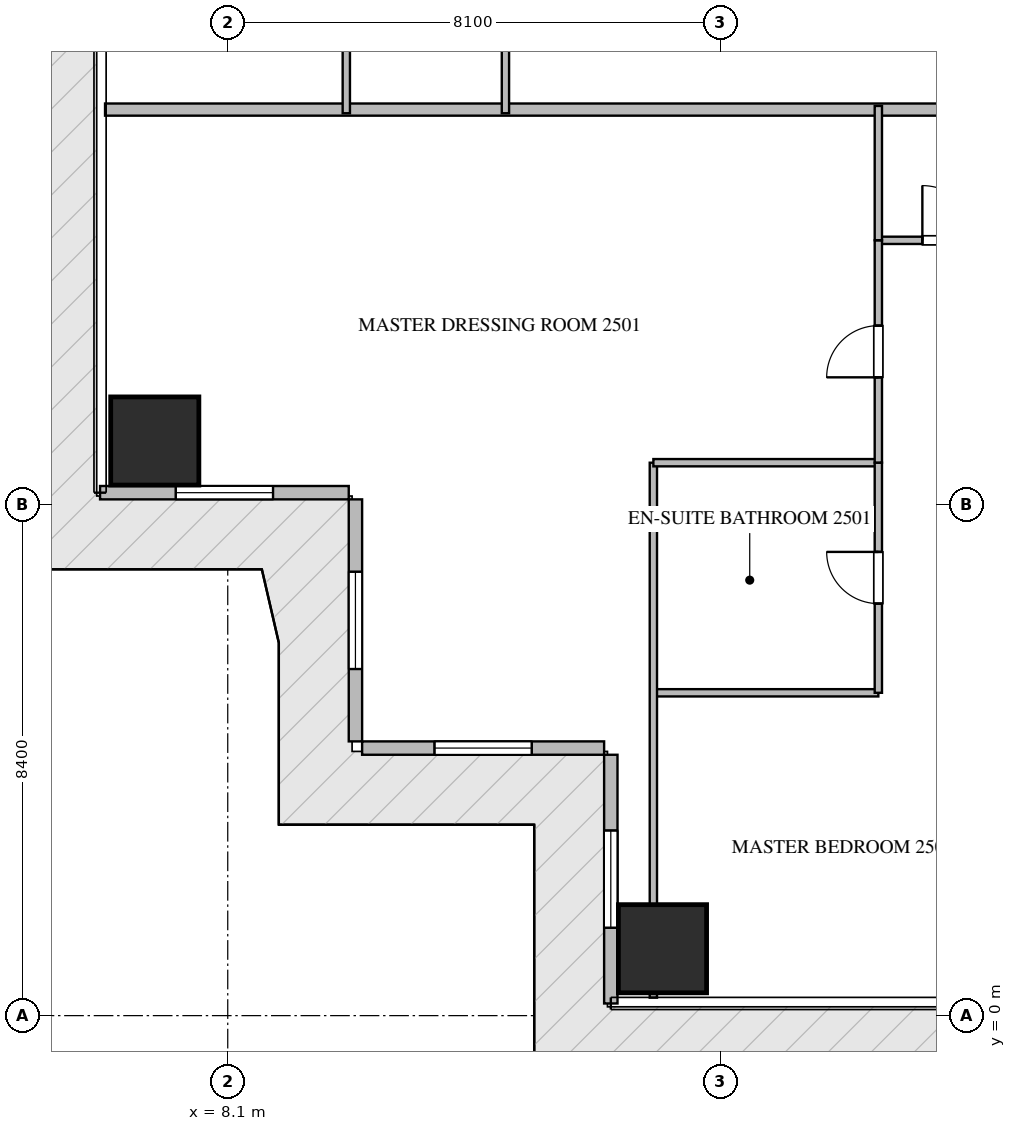
"""IFC4 building model, lengths in metres.
Left out: names, types, materials, properties, quantities, classifications, styles, units other than length and angle.
Written with IfcOpenShell. Run it as: python <this file> out.ifc"""

import sys

from ifc_helpers import new_model, si_unit, direction, frame, frame_2d, origin, origin_2d, place, context, subcontext, project, spatial, rectangle, extrude, source, transform, mapped, element, fill, save


model = new_model("IFC4")
c1 = context("Model", 3, precision=1e-05, world=origin(), true_north=direction((0.0, 1.0)))
c2 = subcontext(c1, "Body", "Model", "MODEL_VIEW")
j1 = project(units=[si_unit("LENGTHUNIT", "METRE"), si_unit("PLANEANGLEUNIT", "RADIAN")], contexts=[c1])
p1 = place(None, origin())
s1 = spatial("IfcSite", under=j1, at=p1, CompositionType="ELEMENT")
p2 = place(p1, origin())
s2 = spatial("IfcBuilding", under=s1, at=p2, CompositionType="ELEMENT")
p3 = place(p2, frame((0.0, 0.0, 101.7)))
s3 = spatial("IfcBuildingStorey", under=s2, at=p3, CompositionType="ELEMENT", Elevation=101.7)
m1 = source(origin(), c2, "Body", "SweptSolid", [
    extrude(rectangle(XDim=1.45, YDim=1.45, at=origin_2d()), origin(), (0.0, 0.0, 1.0), 3.75),
])
for number, where, z_axis, x_axis in (
    (1, (15.25, 1.1, -0.26), (0.0, 0.0, 1.0), (1.0, 0.0, 0.0)),
    (2, (6.9, 9.45, -0.26), (0.0, 0.0, 1.0), (1.0, 0.0, 0.0)),
):
    element("IfcColumn", number, at=place(p3, frame(where, z_axis=z_axis, x_axis=x_axis)), inside=s3, PredefinedType="COLUMN", context=c2, shape_type="MappedRepresentation", body=[
        mapped(m1, transform((0.0, 0.0, 0.0), scale=1.0)),
    ])
p4 = place(p3, frame((6.0, 8.6, 0.0), z_axis=(0.0, 0.0, 1.0), x_axis=(1.0, 0.0, 0.0)))
e3 = element("IfcWall", 3, at=p4, inside=s3, PredefinedType="ELEMENTEDWALL", context=c2, shape_type="SweptSolid", body=[
    extrude(rectangle(XDim=4.09, YDim=0.22, at=frame_2d((2.045, 0.0))), origin(), (0.0, 0.0, 1.0), 3.475),
])
p5 = place(p4, frame((1.245, 0.0, 0.65)))
e4 = element("IfcOpeningElement", 4, at=p5, cuts=e3, PredefinedType="OPENING", context=c2, shape_type="SweptSolid", body=[
    extrude(rectangle(XDim=1.6, YDim=2.1, at=frame_2d((0.8, 1.05))), frame((0.0, 0.12, 0.0), z_axis=(0.0, -1.0, 0.0), x_axis=(1.0, 0.0, 0.0)), (0.0, 0.0, 1.0), 0.24),
])
p6 = place(p3, frame((10.2, 8.49, 0.0), z_axis=(0.0, 0.0, 1.0), x_axis=(0.0, -1.0, 0.0)))
e5 = element("IfcWall", 5, at=p6, inside=s3, PredefinedType="ELEMENTEDWALL", context=c2, shape_type="SweptSolid", body=[
    extrude(rectangle(XDim=3.98, YDim=0.22, at=frame_2d((1.99, 0.0))), origin(), (0.0, 0.0, 1.0), 3.475),
])
p7 = place(p6, frame((1.19, 0.0, 0.65)))
e6 = element("IfcOpeningElement", 6, at=p7, cuts=e5, PredefinedType="OPENING", context=c2, shape_type="SweptSolid", body=[
    extrude(rectangle(XDim=1.6, YDim=2.1, at=frame_2d((0.8, 1.05))), frame((0.0, 0.12, 0.0), z_axis=(0.0, -1.0, 0.0), x_axis=(1.0, 0.0, 0.0)), (0.0, 0.0, 1.0), 0.24),
])
p8 = place(p3, frame((10.31, 4.4, 0.0), z_axis=(0.0, 0.0, 1.0), x_axis=(1.0, 0.0, 0.0)))
e7 = element("IfcWall", 7, at=p8, inside=s3, PredefinedType="ELEMENTEDWALL", context=c2, shape_type="SweptSolid", body=[
    extrude(rectangle(XDim=3.98, YDim=0.22, at=frame_2d((1.99, 0.0))), origin(), (0.0, 0.0, 1.0), 3.475),
])
p9 = place(p8, frame((1.19, 0.0, 0.65)))
e8 = element("IfcOpeningElement", 8, at=p9, cuts=e7, PredefinedType="OPENING", context=c2, shape_type="SweptSolid", body=[
    extrude(rectangle(XDim=1.6, YDim=2.1, at=frame_2d((0.8, 1.05))), frame((0.0, 0.12, 0.0), z_axis=(0.0, -1.0, 0.0), x_axis=(1.0, 0.0, 0.0)), (0.0, 0.0, 1.0), 0.24),
])
p10 = place(p3, frame((14.4, 4.29, 0.0), z_axis=(0.0, 0.0, 1.0), x_axis=(0.0, -1.0, 0.0)))
e9 = element("IfcWall", 9, at=p10, inside=s3, PredefinedType="ELEMENTEDWALL", context=c2, shape_type="SweptSolid", body=[
    extrude(rectangle(XDim=4.09, YDim=0.22, at=frame_2d((2.045, 0.0))), origin(), (0.0, 0.0, 1.0), 3.475),
])
p11 = place(p10, frame((1.245, 0.0, 0.65)))
e10 = element("IfcOpeningElement", 10, at=p11, cuts=e9, PredefinedType="OPENING", context=c2, shape_type="SweptSolid", body=[
    extrude(rectangle(XDim=1.6, YDim=2.1, at=frame_2d((0.8, 1.05))), frame((0.0, 0.12, 0.0), z_axis=(0.0, -1.0, 0.0), x_axis=(1.0, 0.0, 0.0)), (0.0, 0.0, 1.0), 0.24),
])
p12 = place(p3, frame((6.082, 14.9, 0.0), z_axis=(0.0, 0.0, 1.0), x_axis=(1.0, 0.0, 0.0)))
e11 = element("IfcWall", 11, at=p12, inside=s3, PredefinedType="PARTITIONING", context=c2, shape_type="SweptSolid", body=[
    extrude(rectangle(XDim=15.318, YDim=0.2, at=frame_2d((7.659, 0.0))), origin(), (0.0, 0.0, 1.0), 3.49),
])
p13 = place(p3, frame((18.8, 12.75, 0.0), z_axis=(0.0, 0.0, 1.0), x_axis=(1.0, 0.0, 0.0)))
e12 = element("IfcWall", 12, at=p13, inside=s3, PredefinedType="PARTITIONING", context=c2, shape_type="SweptSolid", body=[
    extrude(rectangle(XDim=2.348, YDim=0.12, at=frame_2d((1.174, 0.0))), origin(), (0.0, 0.0, 1.0), 3.49),
])
p14 = place(p13, frame((0.724, 0.0, 0.0)))
e13 = element("IfcOpeningElement", 13, at=p14, cuts=e12, PredefinedType="OPENING", context=c2, shape_type="SweptSolid", body=[
    extrude(rectangle(XDim=0.9, YDim=2.1, at=frame_2d((0.45, 1.05))), frame((0.0, 0.07, 0.0), z_axis=(0.0, -1.0, 0.0), x_axis=(1.0, 0.0, 0.0)), (0.0, 0.0, 1.0), 0.14),
])
p15 = place(p3, frame((15.1, 5.309, 0.0), z_axis=(0.0, 0.0, 1.0), x_axis=(1.0, 0.0, 0.0)))
e14 = element("IfcWall", 14, at=p15, inside=s3, PredefinedType="PARTITIONING", context=c2, shape_type="SweptSolid", body=[
    extrude(rectangle(XDim=3.7, YDim=0.12, at=frame_2d((1.85, 0.0))), origin(), (0.0, 0.0, 1.0), 3.49),
])
p16 = place(p3, frame((15.1, 0.295, 0.0), z_axis=(0.0, 0.0, 1.0), x_axis=(0.0, 1.0, 0.0)))
e15 = element("IfcWall", 15, at=p16, inside=s3, PredefinedType="PARTITIONING", context=c2, shape_type="SweptSolid", body=[
    extrude(rectangle(XDim=8.798, YDim=0.12, at=frame_2d((4.399, 0.0))), origin(), (0.0, 0.0, 1.0), 2.922),
])
p17 = place(p3, frame((15.1, 9.093, 0.0), z_axis=(0.0, 0.0, 1.0), x_axis=(1.0, 0.0, 0.0)))
e16 = element("IfcWall", 16, at=p17, inside=s3, PredefinedType="PARTITIONING", context=c2, shape_type="SweptSolid", body=[
    extrude(rectangle(XDim=3.7, YDim=0.12, at=frame_2d((1.85, 0.0))), origin(), (0.0, 0.0, 1.0), 3.49),
])
p18 = place(p3, frame((18.8, 5.309, 0.0), z_axis=(0.0, 0.0, 1.0), x_axis=(0.0, 1.0, 0.0)))
e17 = element("IfcWall", 17, at=p18, inside=s3, PredefinedType="PARTITIONING", context=c2, shape_type="SweptSolid", body=[
    extrude(rectangle(XDim=3.784, YDim=0.12, at=frame_2d((1.892, 0.0))), origin(), (0.0, 0.0, 1.0), 3.49),
])
p19 = place(p18, frame((1.467, 0.0, 0.0)))
e18 = element("IfcOpeningElement", 18, at=p19, cuts=e17, PredefinedType="OPENING", context=c2, shape_type="SweptSolid", body=[
    extrude(rectangle(XDim=0.85, YDim=2.1, at=frame_2d((0.425, 1.05))), frame((0.0, 0.07, 0.0), z_axis=(0.0, -1.0, 0.0), x_axis=(1.0, 0.0, 0.0)), (0.0, 0.0, 1.0), 0.14),
])
p20 = place(p3, frame((18.8, 9.095, 0.0), z_axis=(0.0, 0.0, 1.0), x_axis=(0.0, 1.0, 0.0)))
e19 = element("IfcWall", 19, at=p20, inside=s3, PredefinedType="PARTITIONING", context=c2, shape_type="SweptSolid", body=[
    extrude(rectangle(XDim=3.655, YDim=0.12, at=frame_2d((1.828, 0.0))), origin(), (0.0, 0.0, 1.0), 3.49),
])
p21 = place(p20, frame((1.402, 0.0, 0.0)))
e20 = element("IfcOpeningElement", 20, at=p21, cuts=e19, PredefinedType="OPENING", context=c2, shape_type="SweptSolid", body=[
    extrude(rectangle(XDim=0.85, YDim=2.1, at=frame_2d((0.425, 1.05))), frame((0.0, 0.07, 0.0), z_axis=(0.0, -1.0, 0.0), x_axis=(1.0, 0.0, 0.0)), (0.0, 0.0, 1.0), 0.14),
])
p22 = place(p3, frame((18.8, 12.752, 0.0), z_axis=(0.0, 0.0, 1.0), x_axis=(0.0, 1.0, 0.0)))
e21 = element("IfcWall", 21, at=p22, inside=s3, PredefinedType="PARTITIONING", context=c2, shape_type="SweptSolid", body=[
    extrude(rectangle(XDim=2.208, YDim=0.12, at=frame_2d((1.104, 0.0))), origin(), (0.0, 0.0, 1.0), 3.49),
])
for number, where, z_axis, x_axis in (
    (22, (10.05, 14.84, 0.0), (0.0, 0.0, 1.0), (0.0, 1.0, 0.0)),
    (23, (12.667, 14.84, 0.0), (0.0, 0.0, 1.0), (0.0, 1.0, 0.0)),
):
    element("IfcWall", number, at=place(p3, frame(where, z_axis=z_axis, x_axis=x_axis)), inside=s3, PredefinedType="PARTITIONING", context=c2, shape_type="SweptSolid", body=[
        extrude(rectangle(XDim=5.41, YDim=0.12, at=frame_2d((2.705, 0.0))), origin(), (0.0, 0.0, 1.0), 3.49),
    ])
m2 = source(origin(), c2, "Body", "SweptSolid", [
    extrude(rectangle(XDim=1.6, YDim=2.1, at=frame_2d((0.8, 1.05))), frame((0.0, 0.03, 0.0), z_axis=(0.0, -1.0, 0.0), x_axis=(1.0, 0.0, 0.0)), (0.0, 0.0, 1.0), 0.06),
])
p23 = place(p5, origin())
e24 = element("IfcWindow", 24, at=p23, inside=s3, PartitioningType="SINGLE_PANEL", PredefinedType="WINDOW", context=c2, shape_type="MappedRepresentation", body=[
    mapped(m2, transform((0.0, 0.0, 0.0), scale=1.0)),
])
fill(e4, e24)
p24 = place(p7, origin())
e25 = element("IfcWindow", 25, at=p24, inside=s3, PartitioningType="SINGLE_PANEL", PredefinedType="WINDOW", context=c2, shape_type="MappedRepresentation", body=[
    mapped(m2, transform((0.0, 0.0, 0.0), scale=1.0)),
])
fill(e6, e25)
p25 = place(p9, origin())
e26 = element("IfcWindow", 26, at=p25, inside=s3, PartitioningType="SINGLE_PANEL", PredefinedType="WINDOW", context=c2, shape_type="MappedRepresentation", body=[
    mapped(m2, transform((0.0, 0.0, 0.0), scale=1.0)),
])
fill(e8, e26)
p26 = place(p11, origin())
e27 = element("IfcWindow", 27, at=p26, inside=s3, PartitioningType="SINGLE_PANEL", PredefinedType="WINDOW", context=c2, shape_type="MappedRepresentation", body=[
    mapped(m2, transform((0.0, 0.0, 0.0), scale=1.0)),
])
fill(e10, e27)
m3 = source(origin(), c2, "Body", "SweptSolid", [
    extrude(rectangle(XDim=0.9, YDim=2.1, at=frame_2d((0.45, 1.05))), frame((0.0, 0.025, 0.0), z_axis=(0.0, -1.0, 0.0), x_axis=(1.0, 0.0, 0.0)), (0.0, 0.0, 1.0), 0.05),
])
p27 = place(p14, origin())
e28 = element("IfcDoor", 28, at=p27, inside=s3, OperationType="SINGLE_SWING_LEFT", PredefinedType="DOOR", context=c2, shape_type="MappedRepresentation", body=[
    mapped(m3, transform((0.0, 0.0, 0.0), scale=1.0)),
])
fill(e13, e28)
m4 = source(origin(), c2, "Body", "SweptSolid", [
    extrude(rectangle(XDim=0.85, YDim=2.1, at=frame_2d((0.425, 1.05))), frame((0.0, 0.025, 0.0), z_axis=(0.0, -1.0, 0.0), x_axis=(1.0, 0.0, 0.0)), (0.0, 0.0, 1.0), 0.05),
])
p28 = place(p19, origin())
e29 = element("IfcDoor", 29, at=p28, inside=s3, OperationType="SINGLE_SWING_RIGHT", PredefinedType="DOOR", context=c2, shape_type="MappedRepresentation", body=[
    mapped(m4, transform((0.0, 0.0, 0.0), scale=1.0)),
])
fill(e18, e29)
p29 = place(p21, origin())
e30 = element("IfcDoor", 30, at=p29, inside=s3, OperationType="SINGLE_SWING_LEFT", PredefinedType="DOOR", context=c2, shape_type="MappedRepresentation", body=[
    mapped(m4, transform((0.0, 0.0, 0.0), scale=1.0)),
])
fill(e20, e30)
save(model, sys.argv[1])
